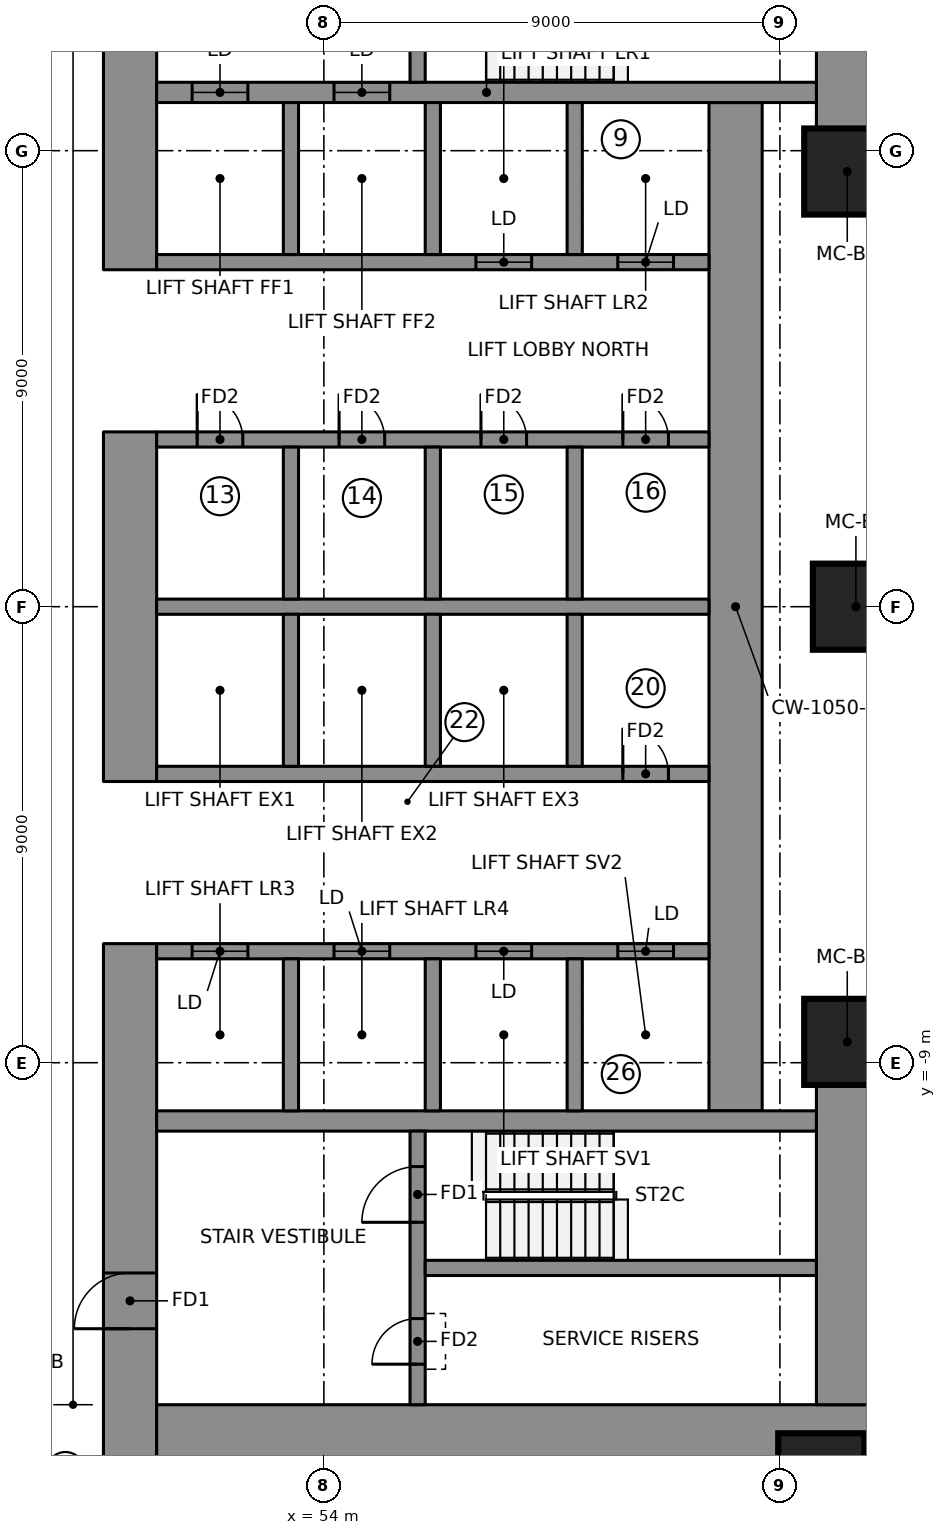
"""IFC4 building model, lengths in metres.
Left out: names, types, materials, properties, quantities, classifications, styles, units other than length and angle.
Written with IfcOpenShell. Run it as: python <this file> out.ifc"""

import sys

from ifc_helpers import new_model, si_unit, direction, frame, frame_2d, origin, origin_2d, place, context, subcontext, project, spatial, rectangle, extrude, element, fill, save


model = new_model("IFC4")
c1 = context("Model", 3, precision=1e-05, world=origin(), true_north=direction((0.0, 1.0)))
c2 = subcontext(c1, "Body", "Model", "MODEL_VIEW")
j1 = project(units=[si_unit("LENGTHUNIT", "METRE"), si_unit("PLANEANGLEUNIT", "RADIAN")], contexts=[c1])
p1 = place(None, origin())
s1 = spatial("IfcSite", under=j1, at=p1, CompositionType="ELEMENT")
p2 = place(p1, origin())
s2 = spatial("IfcBuilding", under=s1, at=p2, CompositionType="ELEMENT")
p3 = place(p2, frame((0.0, 0.0, 102.65)))
s3 = spatial("IfcBuildingStorey", under=s2, at=p3, CompositionType="ELEMENT", Elevation=102.65)
p4 = place(p3, frame((50.175, 6.65, 0.0), z_axis=(0.0, 0.0, 1.0), x_axis=(0.0, 1.0, 0.0)))
e1 = element("IfcWall", 1, at=p4, inside=s3, PredefinedType="SHEAR", context=c2, shape_type="SweptSolid", body=[
    extrude(rectangle(XDim=10.15, YDim=1.05, at=frame_2d((5.075, 0.0))), origin(), (0.0, 0.0, 1.0), 3.55),
])
p5 = place(p4, frame((6.5, 0.0, 0.0)))
e2 = element("IfcOpeningElement", 2, at=p5, cuts=e1, PredefinedType="OPENING", context=c2, shape_type="SweptSolid", body=[
    extrude(rectangle(XDim=1.1, YDim=2.1, at=frame_2d((0.55, 1.05))), frame((0.0, 0.535, 0.0), z_axis=(0.0, -1.0, 0.0), x_axis=(1.0, 0.0, 0.0)), (0.0, 0.0, 1.0), 1.07),
])
p6 = place(p3, frame((50.175, -3.45, 0.0), z_axis=(0.0, 0.0, 1.0), x_axis=(0.0, 1.0, 0.0)))
e3 = element("IfcWall", 3, at=p6, inside=s3, PredefinedType="SHEAR", context=c2, shape_type="SweptSolid", body=[
    extrude(rectangle(XDim=6.9, YDim=1.05, at=frame_2d((3.45, 0.0))), origin(), (0.0, 0.0, 1.0), 3.55),
])
p7 = place(p3, frame((50.175, -16.8, 0.0), z_axis=(0.0, 0.0, 1.0), x_axis=(0.0, 1.0, 0.0)))
e4 = element("IfcWall", 4, at=p7, inside=s3, PredefinedType="SHEAR", context=c2, shape_type="SweptSolid", body=[
    extrude(rectangle(XDim=10.15, YDim=1.05, at=frame_2d((5.075, 0.0))), origin(), (0.0, 0.0, 1.0), 3.55),
])
p8 = place(p7, frame((2.55, 0.0, 0.0)))
e5 = element("IfcOpeningElement", 5, at=p8, cuts=e4, PredefinedType="OPENING", context=c2, shape_type="SweptSolid", body=[
    extrude(rectangle(XDim=1.1, YDim=2.1, at=frame_2d((0.55, 1.05))), frame((0.0, 0.535, 0.0), z_axis=(0.0, -1.0, 0.0), x_axis=(1.0, 0.0, 0.0)), (0.0, 0.0, 1.0), 1.07),
])
p9 = place(p3, frame((50.7, -16.275, 0.0), z_axis=(0.0, 0.0, 1.0), x_axis=(1.0, 0.0, 0.0)))
e6 = element("IfcWall", 6, at=p9, inside=s3, PredefinedType="SHEAR", context=c2, shape_type="SweptSolid", body=[
    extrude(rectangle(XDim=14.07, YDim=1.05, at=frame_2d((7.035, 0.0))), origin(), (0.0, 0.0, 1.0), 3.55),
])
for number, where, z_axis, x_axis in (
    (7, (64.245, 9.389, 0.0), (0.0, 0.0, 1.0), (0.0, 1.0, 0.0)),
    (8, (64.245, -15.75, 0.0), (0.0, 0.0, 1.0), (0.0, 1.0, 0.0)),
):
    element("IfcWall", number, at=place(p3, frame(where, z_axis=z_axis, x_axis=x_axis)), inside=s3, PredefinedType="SHEAR", context=c2, shape_type="SweptSolid", body=[
        extrude(rectangle(XDim=6.361, YDim=1.05, at=frame_2d((3.181, 0.0))), origin(), (0.0, 0.0, 1.0), 3.55),
    ])
p10 = place(p3, frame((62.125, -9.95, 0.0), z_axis=(0.0, 0.0, 1.0), x_axis=(0.0, 1.0, 0.0)))
e9 = element("IfcWall", 9, at=p10, inside=s3, PredefinedType="SHEAR", context=c2, shape_type="SweptSolid", body=[
    extrude(rectangle(XDim=19.9, YDim=1.05, at=frame_2d((9.95, 0.0))), origin(), (0.0, 0.0, 1.0), 3.55),
])
p11 = place(p3, frame((50.7, 10.15, 0.0), z_axis=(0.0, 0.0, 1.0), x_axis=(1.0, 0.0, 0.0)))
e10 = element("IfcWall", 10, at=p11, inside=s3, PredefinedType="SHEAR", context=c2, shape_type="SweptSolid", body=[
    extrude(rectangle(XDim=13.02, YDim=0.4, at=frame_2d((6.51, 0.0))), origin(), (0.0, 0.0, 1.0), 3.55),
])
p12 = place(p11, frame((0.7, 0.0, 0.0)))
e11 = element("IfcOpeningElement", 11, at=p12, cuts=e10, PredefinedType="OPENING", context=c2, shape_type="SweptSolid", body=[
    extrude(rectangle(XDim=1.1, YDim=2.1, at=frame_2d((0.55, 1.05))), frame((0.0, 0.21, 0.0), z_axis=(0.0, -1.0, 0.0), x_axis=(1.0, 0.0, 0.0)), (0.0, 0.0, 1.0), 0.42),
])
p13 = place(p11, frame((3.5, 0.0, 0.0)))
e12 = element("IfcOpeningElement", 12, at=p13, cuts=e10, PredefinedType="OPENING", context=c2, shape_type="SweptSolid", body=[
    extrude(rectangle(XDim=1.1, YDim=2.1, at=frame_2d((0.55, 1.05))), frame((0.0, 0.21, 0.0), z_axis=(0.0, -1.0, 0.0), x_axis=(1.0, 0.0, 0.0)), (0.0, 0.0, 1.0), 0.42),
])
p14 = place(p3, frame((50.7, -10.15, 0.0), z_axis=(0.0, 0.0, 1.0), x_axis=(1.0, 0.0, 0.0)))
e13 = element("IfcWall", 13, at=p14, inside=s3, PredefinedType="SHEAR", context=c2, shape_type="SweptSolid", body=[
    extrude(rectangle(XDim=13.02, YDim=0.4, at=frame_2d((6.51, 0.0))), origin(), (0.0, 0.0, 1.0), 3.55),
])
p15 = place(p3, frame((50.7, 0.0, 0.0), z_axis=(0.0, 0.0, 1.0), x_axis=(1.0, 0.0, 0.0)))
e14 = element("IfcWall", 14, at=p15, inside=s3, PredefinedType="SHEAR", context=c2, shape_type="SweptSolid", body=[
    extrude(rectangle(XDim=10.9, YDim=0.3, at=frame_2d((5.45, 0.0))), origin(), (0.0, 0.0, 1.0), 3.55),
])
p16 = place(p3, frame((50.7, 3.3, 0.0), z_axis=(0.0, 0.0, 1.0), x_axis=(1.0, 0.0, 0.0)))
e15 = element("IfcWall", 15, at=p16, inside=s3, PredefinedType="SHEAR", context=c2, shape_type="SweptSolid", body=[
    extrude(rectangle(XDim=10.9, YDim=0.3, at=frame_2d((5.45, 0.0))), origin(), (0.0, 0.0, 1.0), 3.55),
])
p17 = place(p16, frame((0.8, 0.0, 0.0)))
e16 = element("IfcOpeningElement", 16, at=p17, cuts=e15, PredefinedType="OPENING", context=c2, shape_type="SweptSolid", body=[
    extrude(rectangle(XDim=0.9, YDim=2.1, at=frame_2d((0.45, 1.05))), frame((0.0, 0.16, 0.0), z_axis=(0.0, -1.0, 0.0), x_axis=(1.0, 0.0, 0.0)), (0.0, 0.0, 1.0), 0.32),
])
p18 = place(p16, frame((3.6, 0.0, 0.0)))
e17 = element("IfcOpeningElement", 17, at=p18, cuts=e15, PredefinedType="OPENING", context=c2, shape_type="SweptSolid", body=[
    extrude(rectangle(XDim=0.9, YDim=2.1, at=frame_2d((0.45, 1.05))), frame((0.0, 0.16, 0.0), z_axis=(0.0, -1.0, 0.0), x_axis=(1.0, 0.0, 0.0)), (0.0, 0.0, 1.0), 0.32),
])
p19 = place(p16, frame((6.4, 0.0, 0.0)))
e18 = element("IfcOpeningElement", 18, at=p19, cuts=e15, PredefinedType="OPENING", context=c2, shape_type="SweptSolid", body=[
    extrude(rectangle(XDim=0.9, YDim=2.1, at=frame_2d((0.45, 1.05))), frame((0.0, 0.16, 0.0), z_axis=(0.0, -1.0, 0.0), x_axis=(1.0, 0.0, 0.0)), (0.0, 0.0, 1.0), 0.32),
])
p20 = place(p16, frame((9.2, 0.0, 0.0)))
e19 = element("IfcOpeningElement", 19, at=p20, cuts=e15, PredefinedType="OPENING", context=c2, shape_type="SweptSolid", body=[
    extrude(rectangle(XDim=0.9, YDim=2.1, at=frame_2d((0.45, 1.05))), frame((0.0, 0.16, 0.0), z_axis=(0.0, -1.0, 0.0), x_axis=(1.0, 0.0, 0.0)), (0.0, 0.0, 1.0), 0.32),
])
p21 = place(p3, frame((50.7, 6.8, 0.0), z_axis=(0.0, 0.0, 1.0), x_axis=(1.0, 0.0, 0.0)))
e20 = element("IfcWall", 20, at=p21, inside=s3, PredefinedType="SHEAR", context=c2, shape_type="SweptSolid", body=[
    extrude(rectangle(XDim=10.9, YDim=0.3, at=frame_2d((5.45, 0.0))), origin(), (0.0, 0.0, 1.0), 3.55),
])
p22 = place(p21, frame((6.3, 0.0, 0.0)))
e21 = element("IfcOpeningElement", 21, at=p22, cuts=e20, PredefinedType="OPENING", context=c2, shape_type="SweptSolid", body=[
    extrude(rectangle(XDim=1.1, YDim=2.1, at=frame_2d((0.55, 1.05))), frame((0.0, 0.16, 0.0), z_axis=(0.0, -1.0, 0.0), x_axis=(1.0, 0.0, 0.0)), (0.0, 0.0, 1.0), 0.32),
])
p23 = place(p21, frame((9.1, 0.0, 0.0)))
e22 = element("IfcOpeningElement", 22, at=p23, cuts=e20, PredefinedType="OPENING", context=c2, shape_type="SweptSolid", body=[
    extrude(rectangle(XDim=1.1, YDim=2.1, at=frame_2d((0.55, 1.05))), frame((0.0, 0.16, 0.0), z_axis=(0.0, -1.0, 0.0), x_axis=(1.0, 0.0, 0.0)), (0.0, 0.0, 1.0), 0.32),
])
for number, where, z_axis, x_axis in (
    (23, (53.35, 0.15, 0.0), (0.0, 0.0, 1.0), (0.0, 1.0, 0.0)),
    (24, (53.35, 6.95, 0.0), (0.0, 0.0, 1.0), (0.0, 1.0, 0.0)),
    (25, (56.15, 0.15, 0.0), (0.0, 0.0, 1.0), (0.0, 1.0, 0.0)),
    (26, (56.15, 6.95, 0.0), (0.0, 0.0, 1.0), (0.0, 1.0, 0.0)),
    (27, (58.95, 0.15, 0.0), (0.0, 0.0, 1.0), (0.0, 1.0, 0.0)),
    (28, (58.95, 6.95, 0.0), (0.0, 0.0, 1.0), (0.0, 1.0, 0.0)),
):
    element("IfcWall", number, at=place(p3, frame(where, z_axis=z_axis, x_axis=x_axis)), inside=s3, PredefinedType="SHEAR", context=c2, shape_type="SweptSolid", body=[
        extrude(rectangle(XDim=3.0, YDim=0.3, at=frame_2d((1.5, 0.0))), origin(), (0.0, 0.0, 1.0), 3.55),
    ])
p24 = place(p3, frame((50.7, -3.3, 0.0), z_axis=(0.0, 0.0, 1.0), x_axis=(1.0, 0.0, 0.0)))
e29 = element("IfcWall", 29, at=p24, inside=s3, PredefinedType="SHEAR", context=c2, shape_type="SweptSolid", body=[
    extrude(rectangle(XDim=10.9, YDim=0.3, at=frame_2d((5.45, 0.0))), origin(), (0.0, 0.0, 1.0), 3.55),
])
p25 = place(p24, frame((9.2, 0.0, 0.0)))
e30 = element("IfcOpeningElement", 30, at=p25, cuts=e29, PredefinedType="OPENING", context=c2, shape_type="SweptSolid", body=[
    extrude(rectangle(XDim=0.9, YDim=2.1, at=frame_2d((0.45, 1.05))), frame((0.0, 0.16, 0.0), z_axis=(0.0, -1.0, 0.0), x_axis=(1.0, 0.0, 0.0)), (0.0, 0.0, 1.0), 0.32),
])
p26 = place(p3, frame((50.7, -6.8, 0.0), z_axis=(0.0, 0.0, 1.0), x_axis=(1.0, 0.0, 0.0)))
e31 = element("IfcWall", 31, at=p26, inside=s3, PredefinedType="SHEAR", context=c2, shape_type="SweptSolid", body=[
    extrude(rectangle(XDim=10.9, YDim=0.3, at=frame_2d((5.45, 0.0))), origin(), (0.0, 0.0, 1.0), 3.55),
])
p27 = place(p26, frame((0.7, 0.0, 0.0)))
e32 = element("IfcOpeningElement", 32, at=p27, cuts=e31, PredefinedType="OPENING", context=c2, shape_type="SweptSolid", body=[
    extrude(rectangle(XDim=1.1, YDim=2.1, at=frame_2d((0.55, 1.05))), frame((0.0, 0.16, 0.0), z_axis=(0.0, -1.0, 0.0), x_axis=(1.0, 0.0, 0.0)), (0.0, 0.0, 1.0), 0.32),
])
p28 = place(p26, frame((3.5, 0.0, 0.0)))
e33 = element("IfcOpeningElement", 33, at=p28, cuts=e31, PredefinedType="OPENING", context=c2, shape_type="SweptSolid", body=[
    extrude(rectangle(XDim=1.1, YDim=2.1, at=frame_2d((0.55, 1.05))), frame((0.0, 0.16, 0.0), z_axis=(0.0, -1.0, 0.0), x_axis=(1.0, 0.0, 0.0)), (0.0, 0.0, 1.0), 0.32),
])
p29 = place(p26, frame((6.3, 0.0, 0.0)))
e34 = element("IfcOpeningElement", 34, at=p29, cuts=e31, PredefinedType="OPENING", context=c2, shape_type="SweptSolid", body=[
    extrude(rectangle(XDim=1.1, YDim=2.1, at=frame_2d((0.55, 1.05))), frame((0.0, 0.16, 0.0), z_axis=(0.0, -1.0, 0.0), x_axis=(1.0, 0.0, 0.0)), (0.0, 0.0, 1.0), 0.32),
])
p30 = place(p26, frame((9.1, 0.0, 0.0)))
e35 = element("IfcOpeningElement", 35, at=p30, cuts=e31, PredefinedType="OPENING", context=c2, shape_type="SweptSolid", body=[
    extrude(rectangle(XDim=1.1, YDim=2.1, at=frame_2d((0.55, 1.05))), frame((0.0, 0.16, 0.0), z_axis=(0.0, -1.0, 0.0), x_axis=(1.0, 0.0, 0.0)), (0.0, 0.0, 1.0), 0.32),
])
for number, where, z_axis, x_axis in (
    (36, (53.35, -3.15, 0.0), (0.0, 0.0, 1.0), (0.0, 1.0, 0.0)),
    (37, (53.35, -9.95, 0.0), (0.0, 0.0, 1.0), (0.0, 1.0, 0.0)),
    (38, (56.15, -3.15, 0.0), (0.0, 0.0, 1.0), (0.0, 1.0, 0.0)),
    (39, (56.15, -9.95, 0.0), (0.0, 0.0, 1.0), (0.0, 1.0, 0.0)),
    (40, (58.95, -3.15, 0.0), (0.0, 0.0, 1.0), (0.0, 1.0, 0.0)),
    (41, (58.95, -9.95, 0.0), (0.0, 0.0, 1.0), (0.0, 1.0, 0.0)),
):
    element("IfcWall", number, at=place(p3, frame(where, z_axis=z_axis, x_axis=x_axis)), inside=s3, PredefinedType="SHEAR", context=c2, shape_type="SweptSolid", body=[
        extrude(rectangle(XDim=3.0, YDim=0.3, at=frame_2d((1.5, 0.0))), origin(), (0.0, 0.0, 1.0), 3.55),
    ])
p31 = place(p3, frame((55.85, 10.35, 0.0), z_axis=(0.0, 0.0, 1.0), x_axis=(0.0, 1.0, 0.0)))
e42 = element("IfcWall", 42, at=p31, inside=s3, PredefinedType="SHEAR", context=c2, shape_type="SweptSolid", body=[
    extrude(rectangle(XDim=5.4, YDim=0.3, at=frame_2d((2.7, 0.0))), origin(), (0.0, 0.0, 1.0), 3.55),
])
p32 = place(p31, frame((1.43, 0.0, 0.0)))
e43 = element("IfcOpeningElement", 43, at=p32, cuts=e42, PredefinedType="OPENING", context=c2, shape_type="SweptSolid", body=[
    extrude(rectangle(XDim=1.1, YDim=2.1, at=frame_2d((0.55, 1.05))), frame((0.0, 0.16, 0.0), z_axis=(0.0, -1.0, 0.0), x_axis=(1.0, 0.0, 0.0)), (0.0, 0.0, 1.0), 0.32),
])
p33 = place(p31, frame((3.6, 0.0, 0.0)))
e44 = element("IfcOpeningElement", 44, at=p33, cuts=e42, PredefinedType="OPENING", context=c2, shape_type="SweptSolid", body=[
    extrude(rectangle(XDim=1.1, YDim=2.1, at=frame_2d((0.55, 1.05))), frame((0.0, 0.16, 0.0), z_axis=(0.0, -1.0, 0.0), x_axis=(1.0, 0.0, 0.0)), (0.0, 0.0, 1.0), 0.32),
])
p34 = place(p3, frame((55.85, -15.75, 0.0), z_axis=(0.0, 0.0, 1.0), x_axis=(0.0, 1.0, 0.0)))
e45 = element("IfcWall", 45, at=p34, inside=s3, PredefinedType="SHEAR", context=c2, shape_type="SweptSolid", body=[
    extrude(rectangle(XDim=5.4, YDim=0.3, at=frame_2d((2.7, 0.0))), origin(), (0.0, 0.0, 1.0), 3.55),
])
p35 = place(p34, frame((3.6, 0.0, 0.0)))
e46 = element("IfcOpeningElement", 46, at=p35, cuts=e45, PredefinedType="OPENING", context=c2, shape_type="SweptSolid", body=[
    extrude(rectangle(XDim=1.1, YDim=2.1, at=frame_2d((0.55, 1.05))), frame((0.0, 0.16, 0.0), z_axis=(0.0, -1.0, 0.0), x_axis=(1.0, 0.0, 0.0)), (0.0, 0.0, 1.0), 0.32),
])
p36 = place(p34, frame((0.8, 0.0, 0.0)))
e47 = element("IfcOpeningElement", 47, at=p36, cuts=e45, PredefinedType="OPENING", context=c2, shape_type="SweptSolid", body=[
    extrude(rectangle(XDim=0.9, YDim=2.1, at=frame_2d((0.45, 1.05))), frame((0.0, 0.16, 0.0), z_axis=(0.0, -1.0, 0.0), x_axis=(1.0, 0.0, 0.0)), (0.0, 0.0, 1.0), 0.32),
])
p37 = place(p3, frame((56.0, -13.05, 0.0), z_axis=(0.0, 0.0, 1.0), x_axis=(1.0, 0.0, 0.0)))
e48 = element("IfcWall", 48, at=p37, inside=s3, PredefinedType="SHEAR", context=c2, shape_type="SweptSolid", body=[
    extrude(rectangle(XDim=7.72, YDim=0.3, at=frame_2d((3.86, 0.0))), origin(), (0.0, 0.0, 1.0), 3.55),
])
for number, where, z_axis, x_axis in (
    (49, (63.816, -17.164, 0.0), (0.0, 0.0, 1.0), (1.0, 0.0, 0.0)),
    (50, (64.329, -8.589, 0.0), (0.0, 0.0, 1.0), (1.0, 0.0, 0.0)),
    (51, (64.5, 0.0, 0.0), (0.0, 0.0, 1.0), (1.0, 0.0, 0.0)),
    (52, (64.329, 8.589, 0.0), (0.0, 0.0, 1.0), (1.0, 0.0, 0.0)),
):
    element("IfcColumn", number, at=place(p3, frame(where, z_axis=z_axis, x_axis=x_axis)), inside=s3, PredefinedType="COLUMN", context=c2, shape_type="SweptSolid", body=[
        extrude(rectangle(XDim=1.7, YDim=1.7, at=origin_2d()), origin(), (0.0, 0.0, 1.0), 3.55),
    ])
p38 = place(p12, origin())
e53 = element("IfcDoor", 53, at=p38, inside=s3, OperationType="DOUBLE_DOOR_SLIDING", PredefinedType="DOOR", context=c2, shape_type="SweptSolid", body=[
    extrude(rectangle(XDim=1.1, YDim=2.1, at=frame_2d((0.55, 1.05))), frame((0.0, 0.025, 0.0), z_axis=(0.0, -1.0, 0.0), x_axis=(1.0, 0.0, 0.0)), (0.0, 0.0, 1.0), 0.05),
])
fill(e11, e53)
p39 = place(p13, origin())
e54 = element("IfcDoor", 54, at=p39, inside=s3, OperationType="DOUBLE_DOOR_SLIDING", PredefinedType="DOOR", context=c2, shape_type="SweptSolid", body=[
    extrude(rectangle(XDim=1.1, YDim=2.1, at=frame_2d((0.55, 1.05))), frame((0.0, 0.025, 0.0), z_axis=(0.0, -1.0, 0.0), x_axis=(1.0, 0.0, 0.0)), (0.0, 0.0, 1.0), 0.05),
])
fill(e12, e54)
p40 = place(p22, origin())
e55 = element("IfcDoor", 55, at=p40, inside=s3, OperationType="DOUBLE_DOOR_SLIDING", PredefinedType="DOOR", context=c2, shape_type="SweptSolid", body=[
    extrude(rectangle(XDim=1.1, YDim=2.1, at=frame_2d((0.55, 1.05))), frame((0.0, 0.025, 0.0), z_axis=(0.0, -1.0, 0.0), x_axis=(1.0, 0.0, 0.0)), (0.0, 0.0, 1.0), 0.05),
])
fill(e21, e55)
p41 = place(p23, origin())
e56 = element("IfcDoor", 56, at=p41, inside=s3, OperationType="DOUBLE_DOOR_SLIDING", PredefinedType="DOOR", context=c2, shape_type="SweptSolid", body=[
    extrude(rectangle(XDim=1.1, YDim=2.1, at=frame_2d((0.55, 1.05))), frame((0.0, 0.025, 0.0), z_axis=(0.0, -1.0, 0.0), x_axis=(1.0, 0.0, 0.0)), (0.0, 0.0, 1.0), 0.05),
])
fill(e22, e56)
p42 = place(p27, origin())
e57 = element("IfcDoor", 57, at=p42, inside=s3, OperationType="DOUBLE_DOOR_SLIDING", PredefinedType="DOOR", context=c2, shape_type="SweptSolid", body=[
    extrude(rectangle(XDim=1.1, YDim=2.1, at=frame_2d((0.55, 1.05))), frame((0.0, 0.025, 0.0), z_axis=(0.0, -1.0, 0.0), x_axis=(1.0, 0.0, 0.0)), (0.0, 0.0, 1.0), 0.05),
])
fill(e32, e57)
p43 = place(p28, origin())
e58 = element("IfcDoor", 58, at=p43, inside=s3, OperationType="DOUBLE_DOOR_SLIDING", PredefinedType="DOOR", context=c2, shape_type="SweptSolid", body=[
    extrude(rectangle(XDim=1.1, YDim=2.1, at=frame_2d((0.55, 1.05))), frame((0.0, 0.025, 0.0), z_axis=(0.0, -1.0, 0.0), x_axis=(1.0, 0.0, 0.0)), (0.0, 0.0, 1.0), 0.05),
])
fill(e33, e58)
p44 = place(p29, origin())
e59 = element("IfcDoor", 59, at=p44, inside=s3, OperationType="DOUBLE_DOOR_SLIDING", PredefinedType="DOOR", context=c2, shape_type="SweptSolid", body=[
    extrude(rectangle(XDim=1.1, YDim=2.1, at=frame_2d((0.55, 1.05))), frame((0.0, 0.025, 0.0), z_axis=(0.0, -1.0, 0.0), x_axis=(1.0, 0.0, 0.0)), (0.0, 0.0, 1.0), 0.05),
])
fill(e34, e59)
p45 = place(p30, origin())
e60 = element("IfcDoor", 60, at=p45, inside=s3, OperationType="DOUBLE_DOOR_SLIDING", PredefinedType="DOOR", context=c2, shape_type="SweptSolid", body=[
    extrude(rectangle(XDim=1.1, YDim=2.1, at=frame_2d((0.55, 1.05))), frame((0.0, 0.025, 0.0), z_axis=(0.0, -1.0, 0.0), x_axis=(1.0, 0.0, 0.0)), (0.0, 0.0, 1.0), 0.05),
])
fill(e35, e60)
p46 = place(p35, origin())
e61 = element("IfcDoor", 61, at=p46, inside=s3, OperationType="SINGLE_SWING_RIGHT", PredefinedType="DOOR", context=c2, shape_type="SweptSolid", body=[
    extrude(rectangle(XDim=1.1, YDim=2.1, at=frame_2d((0.55, 1.05))), frame((0.0, 0.025, 0.0), z_axis=(0.0, -1.0, 0.0), x_axis=(1.0, 0.0, 0.0)), (0.0, 0.0, 1.0), 0.05),
])
fill(e46, e61)
p47 = place(p8, origin())
e62 = element("IfcDoor", 62, at=p47, inside=s3, OperationType="SINGLE_SWING_RIGHT", PredefinedType="DOOR", context=c2, shape_type="SweptSolid", body=[
    extrude(rectangle(XDim=1.1, YDim=2.1, at=frame_2d((0.55, 1.05))), frame((0.0, 0.025, 0.0), z_axis=(0.0, -1.0, 0.0), x_axis=(1.0, 0.0, 0.0)), (0.0, 0.0, 1.0), 0.05),
])
fill(e5, e62)
p48 = place(p36, origin())
e63 = element("IfcDoor", 63, at=p48, inside=s3, OperationType="SINGLE_SWING_LEFT", PredefinedType="DOOR", context=c2, shape_type="SweptSolid", body=[
    extrude(rectangle(XDim=0.9, YDim=2.1, at=frame_2d((0.45, 1.05))), frame((0.0, 0.025, 0.0), z_axis=(0.0, -1.0, 0.0), x_axis=(1.0, 0.0, 0.0)), (0.0, 0.0, 1.0), 0.05),
])
fill(e47, e63)
p49 = place(p17, origin())
e64 = element("IfcDoor", 64, at=p49, inside=s3, OperationType="SINGLE_SWING_LEFT", PredefinedType="DOOR", context=c2, shape_type="SweptSolid", body=[
    extrude(rectangle(XDim=0.9, YDim=2.1, at=frame_2d((0.45, 1.05))), frame((0.0, 0.025, 0.0), z_axis=(0.0, -1.0, 0.0), x_axis=(1.0, 0.0, 0.0)), (0.0, 0.0, 1.0), 0.05),
])
fill(e16, e64)
p50 = place(p18, origin())
e65 = element("IfcDoor", 65, at=p50, inside=s3, OperationType="SINGLE_SWING_LEFT", PredefinedType="DOOR", context=c2, shape_type="SweptSolid", body=[
    extrude(rectangle(XDim=0.9, YDim=2.1, at=frame_2d((0.45, 1.05))), frame((0.0, 0.025, 0.0), z_axis=(0.0, -1.0, 0.0), x_axis=(1.0, 0.0, 0.0)), (0.0, 0.0, 1.0), 0.05),
])
fill(e17, e65)
p51 = place(p19, origin())
e66 = element("IfcDoor", 66, at=p51, inside=s3, OperationType="SINGLE_SWING_LEFT", PredefinedType="DOOR", context=c2, shape_type="SweptSolid", body=[
    extrude(rectangle(XDim=0.9, YDim=2.1, at=frame_2d((0.45, 1.05))), frame((0.0, 0.025, 0.0), z_axis=(0.0, -1.0, 0.0), x_axis=(1.0, 0.0, 0.0)), (0.0, 0.0, 1.0), 0.05),
])
fill(e18, e66)
p52 = place(p20, origin())
e67 = element("IfcDoor", 67, at=p52, inside=s3, OperationType="SINGLE_SWING_LEFT", PredefinedType="DOOR", context=c2, shape_type="SweptSolid", body=[
    extrude(rectangle(XDim=0.9, YDim=2.1, at=frame_2d((0.45, 1.05))), frame((0.0, 0.025, 0.0), z_axis=(0.0, -1.0, 0.0), x_axis=(1.0, 0.0, 0.0)), (0.0, 0.0, 1.0), 0.05),
])
fill(e19, e67)
p53 = place(p25, origin())
e68 = element("IfcDoor", 68, at=p53, inside=s3, OperationType="SINGLE_SWING_LEFT", PredefinedType="DOOR", context=c2, shape_type="SweptSolid", body=[
    extrude(rectangle(XDim=0.9, YDim=2.1, at=frame_2d((0.45, 1.05))), frame((0.0, 0.025, 0.0), z_axis=(0.0, -1.0, 0.0), x_axis=(1.0, 0.0, 0.0)), (0.0, 0.0, 1.0), 0.05),
])
fill(e30, e68)
save(model, sys.argv[1])
